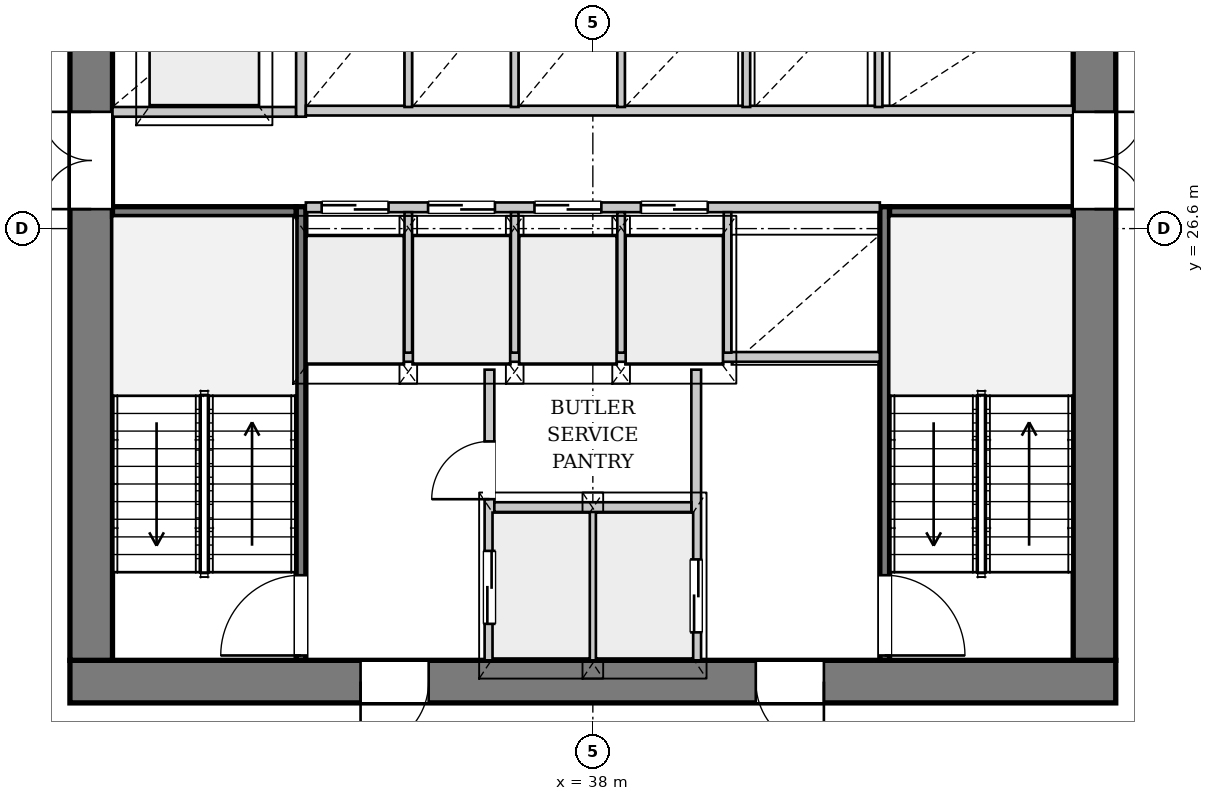
"""IFC4 building model, lengths in metres.
Left out: names, types, materials, properties, quantities, classifications, styles, units other than length and angle.
Written with IfcOpenShell. Run it as: python <this file> out.ifc"""

import sys

from ifc_helpers import new_model, si_unit, direction, frame, frame_2d, origin, place, context, subcontext, project, spatial, rectangle, extrude, source, transform, mapped, element, fill, save


model = new_model("IFC4")
c1 = context("Model", 3, precision=1e-05, world=origin(), true_north=direction((0.0, 1.0)))
c2 = subcontext(c1, "Body", "Model", "MODEL_VIEW")
j1 = project(units=[si_unit("LENGTHUNIT", "METRE"), si_unit("PLANEANGLEUNIT", "RADIAN")], contexts=[c1])
p1 = place(None, origin())
s1 = spatial("IfcSite", under=j1, at=p1, CompositionType="ELEMENT")
p2 = place(p1, origin())
s2 = spatial("IfcBuilding", under=s1, at=p2, CompositionType="ELEMENT")
p3 = place(p2, frame((0.0, 0.0, 109.25)))
s3 = spatial("IfcBuildingStorey", under=s2, at=p3, CompositionType="ELEMENT", Elevation=109.25)
p4 = place(p3, frame((46.6, 19.15, 0.0), z_axis=(0.0, 0.0, 1.0), x_axis=(-1.0, 0.0, 0.0)))
e1 = element("IfcWall", 1, at=p4, inside=s3, PredefinedType="SHEAR", context=c2, shape_type="SweptSolid", body=[
    extrude(rectangle(XDim=17.2, YDim=0.7, at=frame_2d((8.6, 0.0))), origin(), (0.0, 0.0, 1.0), 3.3),
])
p5 = place(p4, frame((4.8, 0.0, 0.0)))
e2 = element("IfcOpeningElement", 2, at=p5, cuts=e1, PredefinedType="OPENING", context=c2, shape_type="SweptSolid", body=[
    extrude(rectangle(XDim=1.12, YDim=2.25, at=frame_2d((0.56, 1.125))), frame((0.0, 0.36, 0.0), z_axis=(0.0, -1.0, 0.0), x_axis=(1.0, 0.0, 0.0)), (0.0, 0.0, 1.0), 0.72),
])
p6 = place(p4, frame((11.3, 0.0, 0.0)))
e3 = element("IfcOpeningElement", 3, at=p6, cuts=e1, PredefinedType="OPENING", context=c2, shape_type="SweptSolid", body=[
    extrude(rectangle(XDim=1.12, YDim=2.25, at=frame_2d((0.56, 1.125))), frame((0.0, 0.36, 0.0), z_axis=(0.0, -1.0, 0.0), x_axis=(1.0, 0.0, 0.0)), (0.0, 0.0, 1.0), 0.72),
])
p7 = place(p3, frame((29.75, 19.5, 0.0), z_axis=(0.0, 0.0, 1.0), x_axis=(0.0, 1.0, 0.0)))
e4 = element("IfcWall", 4, at=p7, inside=s3, PredefinedType="SHEAR", context=c2, shape_type="SweptSolid", body=[
    extrude(rectangle(XDim=14.2, YDim=0.7, at=frame_2d((7.1, 0.0))), origin(), (0.0, 0.0, 1.0), 3.3),
])
p8 = place(p7, frame((7.42, 0.0, 0.0)))
e5 = element("IfcOpeningElement", 5, at=p8, cuts=e4, PredefinedType="OPENING", context=c2, shape_type="SweptSolid", body=[
    extrude(rectangle(XDim=1.6, YDim=2.2, at=frame_2d((0.8, 1.1))), frame((0.0, 0.36, 0.0), z_axis=(0.0, -1.0, 0.0), x_axis=(1.0, 0.0, 0.0)), (0.0, 0.0, 1.0), 0.72),
])
p9 = place(p3, frame((46.25, 33.7, 0.0), z_axis=(0.0, 0.0, 1.0), x_axis=(0.0, -1.0, 0.0)))
e6 = element("IfcWall", 6, at=p9, inside=s3, PredefinedType="SHEAR", context=c2, shape_type="SweptSolid", body=[
    extrude(rectangle(XDim=14.2, YDim=0.7, at=frame_2d((7.1, 0.0))), origin(), (0.0, 0.0, 1.0), 3.3),
])
p10 = place(p9, frame((5.18, 0.0, 0.0)))
e7 = element("IfcOpeningElement", 7, at=p10, cuts=e6, PredefinedType="OPENING", context=c2, shape_type="SweptSolid", body=[
    extrude(rectangle(XDim=1.6, YDim=2.2, at=frame_2d((0.8, 1.1))), frame((0.0, 0.36, 0.0), z_axis=(0.0, -1.0, 0.0), x_axis=(1.0, 0.0, 0.0)), (0.0, 0.0, 1.0), 0.72),
])
p11 = place(p3, frame((33.2, 19.5, 0.0), z_axis=(0.0, 0.0, 1.0), x_axis=(0.0, 1.0, 0.0)))
e8 = element("IfcWall", 8, at=p11, inside=s3, PredefinedType="PARTITIONING", context=c2, shape_type="SweptSolid", body=[
    extrude(rectangle(XDim=7.46, YDim=0.16, at=frame_2d((3.73, 0.0))), origin(), (0.0, 0.0, 1.0), 3.3),
])
p12 = place(p11, frame((0.08, 0.0, 0.0)))
e9 = element("IfcOpeningElement", 9, at=p12, cuts=e8, PredefinedType="OPENING", context=c2, shape_type="SweptSolid", body=[
    extrude(rectangle(XDim=1.32, YDim=2.2, at=frame_2d((0.66, 1.1))), frame((0.0, 0.09, 0.0), z_axis=(0.0, -1.0, 0.0), x_axis=(1.0, 0.0, 0.0)), (0.0, 0.0, 1.0), 0.18),
])
p13 = place(p3, frame((30.1, 26.88, 0.0), z_axis=(0.0, 0.0, 1.0), x_axis=(1.0, 0.0, 0.0)))
e10 = element("IfcWall", 10, at=p13, inside=s3, PredefinedType="PARTITIONING", context=c2, shape_type="SweptSolid", body=[
    extrude(rectangle(XDim=3.02, YDim=0.16, at=frame_2d((1.51, 0.0))), origin(), (0.0, 0.0, 1.0), 3.3),
])
p14 = place(p3, frame((42.8, 26.96, 0.0), z_axis=(0.0, 0.0, 1.0), x_axis=(0.0, -1.0, 0.0)))
e11 = element("IfcWall", 11, at=p14, inside=s3, PredefinedType="PARTITIONING", context=c2, shape_type="SweptSolid", body=[
    extrude(rectangle(XDim=7.46, YDim=0.16, at=frame_2d((3.73, 0.0))), origin(), (0.0, 0.0, 1.0), 3.3),
])
p15 = place(p14, frame((6.06, 0.0, 0.0)))
e12 = element("IfcOpeningElement", 12, at=p15, cuts=e11, PredefinedType="OPENING", context=c2, shape_type="SweptSolid", body=[
    extrude(rectangle(XDim=1.32, YDim=2.2, at=frame_2d((0.66, 1.1))), frame((0.0, 0.09, 0.0), z_axis=(0.0, -1.0, 0.0), x_axis=(1.0, 0.0, 0.0)), (0.0, 0.0, 1.0), 0.18),
])
p16 = place(p3, frame((42.88, 26.88, 0.0), z_axis=(0.0, 0.0, 1.0), x_axis=(1.0, 0.0, 0.0)))
e13 = element("IfcWall", 13, at=p16, inside=s3, PredefinedType="PARTITIONING", context=c2, shape_type="SweptSolid", body=[
    extrude(rectangle(XDim=3.02, YDim=0.16, at=frame_2d((1.51, 0.0))), origin(), (0.0, 0.0, 1.0), 3.3),
])
p17 = place(p3, frame((36.3, 19.5, 0.0), z_axis=(0.0, 0.0, 1.0), x_axis=(0.0, 1.0, 0.0)))
e14 = element("IfcWall", 14, at=p17, inside=s3, PredefinedType="PARTITIONING", context=c2, shape_type="SweptSolid", body=[
    extrude(rectangle(XDim=4.78, YDim=0.16, at=frame_2d((2.39, 0.0))), origin(), (0.0, 0.0, 1.0), 3.3),
])
p18 = place(p17, frame((0.6, 0.0, 0.0)))
e15 = element("IfcOpeningElement", 15, at=p18, cuts=e14, PredefinedType="OPENING", context=c2, shape_type="SweptSolid", body=[
    extrude(rectangle(XDim=1.2, YDim=2.2, at=frame_2d((0.6, 1.1))), frame((0.0, 0.09, 0.0), z_axis=(0.0, -1.0, 0.0), x_axis=(1.0, 0.0, 0.0)), (0.0, 0.0, 1.0), 0.18),
])
p19 = place(p17, frame((2.65, 0.0, 0.0)))
e16 = element("IfcOpeningElement", 16, at=p19, cuts=e14, PredefinedType="OPENING", context=c2, shape_type="SweptSolid", body=[
    extrude(rectangle(XDim=0.95, YDim=2.1, at=frame_2d((0.475, 1.05))), frame((0.0, 0.09, 0.0), z_axis=(0.0, -1.0, 0.0), x_axis=(1.0, 0.0, 0.0)), (0.0, 0.0, 1.0), 0.18),
])
p20 = place(p3, frame((39.7, 24.28, 0.0), z_axis=(0.0, 0.0, 1.0), x_axis=(0.0, -1.0, 0.0)))
e17 = element("IfcWall", 17, at=p20, inside=s3, PredefinedType="PARTITIONING", context=c2, shape_type="SweptSolid", body=[
    extrude(rectangle(XDim=4.78, YDim=0.16, at=frame_2d((2.39, 0.0))), origin(), (0.0, 0.0, 1.0), 3.3),
])
p21 = place(p20, frame((3.12, 0.0, 0.0)))
e18 = element("IfcOpeningElement", 18, at=p21, cuts=e17, PredefinedType="OPENING", context=c2, shape_type="SweptSolid", body=[
    extrude(rectangle(XDim=1.2, YDim=2.2, at=frame_2d((0.6, 1.1))), frame((0.0, 0.09, 0.0), z_axis=(0.0, -1.0, 0.0), x_axis=(1.0, 0.0, 0.0)), (0.0, 0.0, 1.0), 0.18),
])
p22 = place(p3, frame((38.0, 19.5, 0.0), z_axis=(0.0, 0.0, 1.0), x_axis=(0.0, 1.0, 0.0)))
e19 = element("IfcWall", 19, at=p22, inside=s3, PredefinedType="PARTITIONING", context=c2, shape_type="SweptSolid", body=[
    extrude(rectangle(XDim=2.46, YDim=0.125, at=frame_2d((1.23, 0.0))), origin(), (0.0, 0.0, 1.0), 3.3),
])
p23 = place(p3, frame((36.38, 22.02, 0.0), z_axis=(0.0, 0.0, 1.0), x_axis=(1.0, 0.0, 0.0)))
e20 = element("IfcWall", 20, at=p23, inside=s3, PredefinedType="PARTITIONING", context=c2, shape_type="SweptSolid", body=[
    extrude(rectangle(XDim=3.24, YDim=0.16, at=frame_2d((1.62, 0.0))), origin(), (0.0, 0.0, 1.0), 3.3),
])
p24 = place(p3, frame((33.28, 24.49, 0.0), z_axis=(0.0, 0.0, 1.0), x_axis=(1.0, 0.0, 0.0)))
e21 = element("IfcWall", 21, at=p24, inside=s3, PredefinedType="PARTITIONING", context=c2, shape_type="SweptSolid", body=[
    extrude(rectangle(XDim=9.44, YDim=0.16, at=frame_2d((4.72, 0.0))), origin(), (0.0, 0.0, 1.0), 3.3),
])
p25 = place(p3, frame((30.1, 28.52, 0.0), z_axis=(0.0, 0.0, 1.0), x_axis=(1.0, 0.0, 0.0)))
e22 = element("IfcWall", 22, at=p25, inside=s3, PredefinedType="PARTITIONING", context=c2, shape_type="SweptSolid", body=[
    extrude(rectangle(XDim=3.02, YDim=0.16, at=frame_2d((1.51, 0.0))), origin(), (0.0, 0.0, 1.0), 3.3),
])
p26 = place(p3, frame((33.2, 28.44, 0.0), z_axis=(0.0, 0.0, 1.0), x_axis=(0.0, 1.0, 0.0)))
e23 = element("IfcWall", 23, at=p26, inside=s3, PredefinedType="PARTITIONING", context=c2, shape_type="SweptSolid", body=[
    extrude(rectangle(XDim=5.26, YDim=0.16, at=frame_2d((2.63, 0.0))), origin(), (0.0, 0.0, 1.0), 3.3),
])
p27 = place(p3, frame((33.28, 26.95, 0.0), z_axis=(0.0, 0.0, 1.0), x_axis=(1.0, 0.0, 0.0)))
e24 = element("IfcWall", 24, at=p27, inside=s3, PredefinedType="PARTITIONING", context=c2, shape_type="SweptSolid", body=[
    extrude(rectangle(XDim=9.44, YDim=0.16, at=frame_2d((4.72, 0.0))), origin(), (0.0, 0.0, 1.0), 3.3),
])
p28 = place(p27, frame((0.26, 0.0, 0.0)))
e25 = element("IfcOpeningElement", 25, at=p28, cuts=e24, PredefinedType="OPENING", context=c2, shape_type="SweptSolid", body=[
    extrude(rectangle(XDim=1.1, YDim=2.2, at=frame_2d((0.55, 1.1))), frame((0.0, 0.09, 0.0), z_axis=(0.0, -1.0, 0.0), x_axis=(1.0, 0.0, 0.0)), (0.0, 0.0, 1.0), 0.18),
])
p29 = place(p27, frame((2.01, 0.0, 0.0)))
e26 = element("IfcOpeningElement", 26, at=p29, cuts=e24, PredefinedType="OPENING", context=c2, shape_type="SweptSolid", body=[
    extrude(rectangle(XDim=1.1, YDim=2.2, at=frame_2d((0.55, 1.1))), frame((0.0, 0.09, 0.0), z_axis=(0.0, -1.0, 0.0), x_axis=(1.0, 0.0, 0.0)), (0.0, 0.0, 1.0), 0.18),
])
p30 = place(p27, frame((3.76, 0.0, 0.0)))
e27 = element("IfcOpeningElement", 27, at=p30, cuts=e24, PredefinedType="OPENING", context=c2, shape_type="SweptSolid", body=[
    extrude(rectangle(XDim=1.1, YDim=2.2, at=frame_2d((0.55, 1.1))), frame((0.0, 0.09, 0.0), z_axis=(0.0, -1.0, 0.0), x_axis=(1.0, 0.0, 0.0)), (0.0, 0.0, 1.0), 0.18),
])
p31 = place(p27, frame((5.51, 0.0, 0.0)))
e28 = element("IfcOpeningElement", 28, at=p31, cuts=e24, PredefinedType="OPENING", context=c2, shape_type="SweptSolid", body=[
    extrude(rectangle(XDim=1.1, YDim=2.2, at=frame_2d((0.55, 1.1))), frame((0.0, 0.09, 0.0), z_axis=(0.0, -1.0, 0.0), x_axis=(1.0, 0.0, 0.0)), (0.0, 0.0, 1.0), 0.18),
])
for number, where, z_axis, x_axis in (
    (29, (34.965, 24.56, 0.0), (0.0, 0.0, 1.0), (0.0, 1.0, 0.0)),
    (30, (36.715, 24.56, 0.0), (0.0, 0.0, 1.0), (0.0, 1.0, 0.0)),
    (31, (38.465, 24.56, 0.0), (0.0, 0.0, 1.0), (0.0, 1.0, 0.0)),
    (32, (40.215, 24.56, 0.0), (0.0, 0.0, 1.0), (0.0, 1.0, 0.0)),
):
    element("IfcWall", number, at=place(p3, frame(where, z_axis=z_axis, x_axis=x_axis)), inside=s3, PredefinedType="PARTITIONING", context=c2, shape_type="SweptSolid", body=[
        extrude(rectangle(XDim=2.31, YDim=0.125, at=frame_2d((1.155, 0.0))), origin(), (0.0, 0.0, 1.0), 3.3),
    ])
p32 = place(p3, frame((33.28, 28.54, 0.0), z_axis=(0.0, 0.0, 1.0), x_axis=(1.0, 0.0, 0.0)))
e33 = element("IfcWall", 33, at=p32, inside=s3, PredefinedType="PARTITIONING", context=c2, shape_type="SweptSolid", body=[
    extrude(rectangle(XDim=12.62, YDim=0.16, at=frame_2d((6.31, 0.0))), origin(), (0.0, 0.0, 1.0), 3.3),
])
for number, where, z_axis, x_axis in (
    (34, (34.965, 28.6, 0.0), (0.0, 0.0, 1.0), (0.0, 1.0, 0.0)),
    (35, (36.715, 28.6, 0.0), (0.0, 0.0, 1.0), (0.0, 1.0, 0.0)),
    (36, (38.465, 28.6, 0.0), (0.0, 0.0, 1.0), (0.0, 1.0, 0.0)),
    (37, (40.525, 28.6, 0.0), (0.0, 0.0, 1.0), (0.0, 1.0, 0.0)),
    (38, (42.7, 28.6, 0.0), (0.0, 0.0, 1.0), (0.0, 1.0, 0.0)),
):
    element("IfcWall", number, at=place(p3, frame(where, z_axis=z_axis, x_axis=x_axis)), inside=s3, PredefinedType="PARTITIONING", context=c2, shape_type="SweptSolid", body=[
        extrude(rectangle(XDim=1.92, YDim=0.125, at=frame_2d((0.96, 0.0))), origin(), (0.0, 0.0, 1.0), 3.3),
    ])
m1 = source(origin(), c2, "Body", "SweptSolid", [
    extrude(rectangle(XDim=1.12, YDim=2.25, at=frame_2d((0.56, 1.125))), frame((0.0, 0.025, 0.0), z_axis=(0.0, -1.0, 0.0), x_axis=(1.0, 0.0, 0.0)), (0.0, 0.0, 1.0), 0.05),
])
p33 = place(p5, origin())
e39 = element("IfcDoor", 39, at=p33, inside=s3, OperationType="SINGLE_SWING_LEFT", PredefinedType="DOOR", context=c2, shape_type="MappedRepresentation", body=[
    mapped(m1, transform((0.0, 0.0, 0.0), x_axis=(1.0, 0.0, 0.0), y_axis=(0.0, 1.0, 0.0), z_axis=(0.0, 0.0, 1.0), scale=1.0)),
])
fill(e2, e39)
p34 = place(p6, origin())
e40 = element("IfcDoor", 40, at=p34, inside=s3, OperationType="SINGLE_SWING_RIGHT", PredefinedType="DOOR", context=c2, shape_type="MappedRepresentation", body=[
    mapped(m1, transform((0.0, 0.0, 0.0), x_axis=(1.0, 0.0, 0.0), y_axis=(0.0, 1.0, 0.0), z_axis=(0.0, 0.0, 1.0), scale=1.0)),
])
fill(e3, e40)
m2 = source(origin(), c2, "Body", "SweptSolid", [
    extrude(rectangle(XDim=1.6, YDim=2.2, at=frame_2d((0.8, 1.1))), frame((0.0, 0.025, 0.0), z_axis=(0.0, -1.0, 0.0), x_axis=(1.0, 0.0, 0.0)), (0.0, 0.0, 1.0), 0.05),
])
p35 = place(p8, origin())
e41 = element("IfcDoor", 41, at=p35, inside=s3, OperationType="DOUBLE_DOOR_SINGLE_SWING", PredefinedType="DOOR", context=c2, shape_type="MappedRepresentation", body=[
    mapped(m2, transform((0.0, 0.0, 0.0), x_axis=(1.0, 0.0, 0.0), y_axis=(0.0, 1.0, 0.0), z_axis=(0.0, 0.0, 1.0), scale=1.0)),
])
fill(e5, e41)
p36 = place(p10, origin())
e42 = element("IfcDoor", 42, at=p36, inside=s3, OperationType="DOUBLE_DOOR_SINGLE_SWING", PredefinedType="DOOR", context=c2, shape_type="MappedRepresentation", body=[
    mapped(m2, transform((0.0, 0.0, 0.0), x_axis=(1.0, 0.0, 0.0), y_axis=(0.0, 1.0, 0.0), z_axis=(0.0, 0.0, 1.0), scale=1.0)),
])
fill(e7, e42)
m3 = source(origin(), c2, "Body", "SweptSolid", [
    extrude(rectangle(XDim=1.32, YDim=2.2, at=frame_2d((0.66, 1.1))), frame((0.0, 0.025, 0.0), z_axis=(0.0, -1.0, 0.0), x_axis=(1.0, 0.0, 0.0)), (0.0, 0.0, 1.0), 0.05),
])
p37 = place(p12, origin())
e43 = element("IfcDoor", 43, at=p37, inside=s3, OperationType="SINGLE_SWING_LEFT", PredefinedType="DOOR", context=c2, shape_type="MappedRepresentation", body=[
    mapped(m3, transform((0.0, 0.0, 0.0), x_axis=(1.0, 0.0, 0.0), y_axis=(0.0, 1.0, 0.0), z_axis=(0.0, 0.0, 1.0), scale=1.0)),
])
fill(e9, e43)
p38 = place(p15, origin())
e44 = element("IfcDoor", 44, at=p38, inside=s3, OperationType="SINGLE_SWING_RIGHT", PredefinedType="DOOR", context=c2, shape_type="MappedRepresentation", body=[
    mapped(m3, transform((0.0, 0.0, 0.0), x_axis=(1.0, 0.0, 0.0), y_axis=(0.0, 1.0, 0.0), z_axis=(0.0, 0.0, 1.0), scale=1.0)),
])
fill(e12, e44)
m4 = source(origin(), c2, "Body", "SweptSolid", [
    extrude(rectangle(XDim=1.2, YDim=2.2, at=frame_2d((0.6, 1.1))), frame((0.0, 0.025, 0.0), z_axis=(0.0, -1.0, 0.0), x_axis=(1.0, 0.0, 0.0)), (0.0, 0.0, 1.0), 0.05),
])
p39 = place(p18, origin())
e45 = element("IfcDoor", 45, at=p39, inside=s3, OperationType="DOUBLE_DOOR_SLIDING", PredefinedType="DOOR", context=c2, shape_type="MappedRepresentation", body=[
    mapped(m4, transform((0.0, 0.0, 0.0), x_axis=(1.0, 0.0, 0.0), y_axis=(0.0, 1.0, 0.0), z_axis=(0.0, 0.0, 1.0), scale=1.0)),
])
fill(e15, e45)
m5 = source(origin(), c2, "Body", "SweptSolid", [
    extrude(rectangle(XDim=0.95, YDim=2.1, at=frame_2d((0.475, 1.05))), frame((0.0, 0.025, 0.0), z_axis=(0.0, -1.0, 0.0), x_axis=(1.0, 0.0, 0.0)), (0.0, 0.0, 1.0), 0.05),
])
p40 = place(p19, origin())
e46 = element("IfcDoor", 46, at=p40, inside=s3, OperationType="SINGLE_SWING_LEFT", PredefinedType="DOOR", context=c2, shape_type="MappedRepresentation", body=[
    mapped(m5, transform((0.0, 0.0, 0.0), x_axis=(1.0, 0.0, 0.0), y_axis=(0.0, 1.0, 0.0), z_axis=(0.0, 0.0, 1.0), scale=1.0)),
])
fill(e16, e46)
p41 = place(p21, origin())
e47 = element("IfcDoor", 47, at=p41, inside=s3, OperationType="DOUBLE_DOOR_SLIDING", PredefinedType="DOOR", context=c2, shape_type="MappedRepresentation", body=[
    mapped(m4, transform((0.0, 0.0, 0.0), x_axis=(1.0, 0.0, 0.0), y_axis=(0.0, 1.0, 0.0), z_axis=(0.0, 0.0, 1.0), scale=1.0)),
])
fill(e18, e47)
m6 = source(origin(), c2, "Body", "SweptSolid", [
    extrude(rectangle(XDim=1.1, YDim=2.2, at=frame_2d((0.55, 1.1))), frame((0.0, 0.025, 0.0), z_axis=(0.0, -1.0, 0.0), x_axis=(1.0, 0.0, 0.0)), (0.0, 0.0, 1.0), 0.05),
])
p42 = place(p28, origin())
e48 = element("IfcDoor", 48, at=p42, inside=s3, OperationType="DOUBLE_DOOR_SLIDING", PredefinedType="DOOR", context=c2, shape_type="MappedRepresentation", body=[
    mapped(m6, transform((0.0, 0.0, 0.0), x_axis=(1.0, 0.0, 0.0), y_axis=(0.0, 1.0, 0.0), z_axis=(0.0, 0.0, 1.0), scale=1.0)),
])
fill(e25, e48)
p43 = place(p29, origin())
e49 = element("IfcDoor", 49, at=p43, inside=s3, OperationType="DOUBLE_DOOR_SLIDING", PredefinedType="DOOR", context=c2, shape_type="MappedRepresentation", body=[
    mapped(m6, transform((0.0, 0.0, 0.0), x_axis=(1.0, 0.0, 0.0), y_axis=(0.0, 1.0, 0.0), z_axis=(0.0, 0.0, 1.0), scale=1.0)),
])
fill(e26, e49)
p44 = place(p30, origin())
e50 = element("IfcDoor", 50, at=p44, inside=s3, OperationType="DOUBLE_DOOR_SLIDING", PredefinedType="DOOR", context=c2, shape_type="MappedRepresentation", body=[
    mapped(m6, transform((0.0, 0.0, 0.0), x_axis=(1.0, 0.0, 0.0), y_axis=(0.0, 1.0, 0.0), z_axis=(0.0, 0.0, 1.0), scale=1.0)),
])
fill(e27, e50)
p45 = place(p31, origin())
e51 = element("IfcDoor", 51, at=p45, inside=s3, OperationType="DOUBLE_DOOR_SLIDING", PredefinedType="DOOR", context=c2, shape_type="MappedRepresentation", body=[
    mapped(m6, transform((0.0, 0.0, 0.0), x_axis=(1.0, 0.0, 0.0), y_axis=(0.0, 1.0, 0.0), z_axis=(0.0, 0.0, 1.0), scale=1.0)),
])
fill(e28, e51)
save(model, sys.argv[1])
